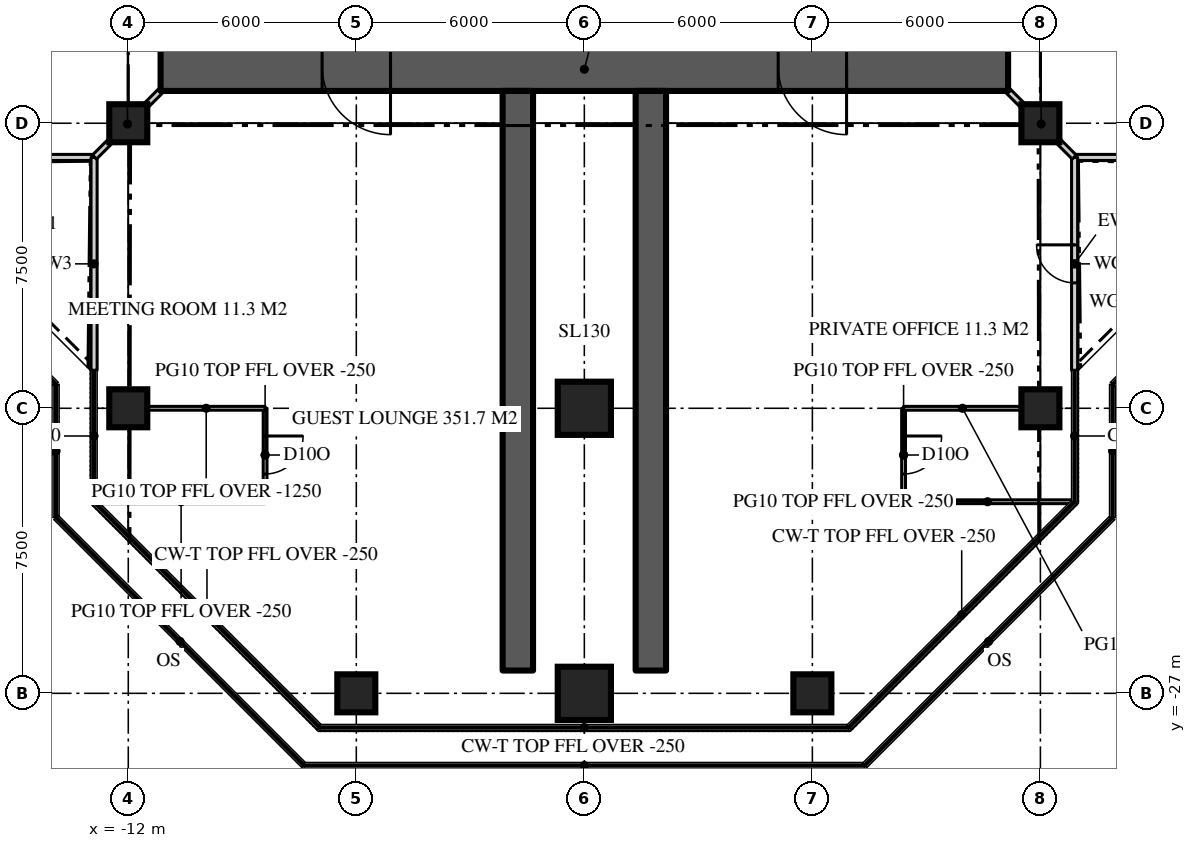
"""IFC4 building model, lengths in metres.
Left out: names, types, materials, properties, quantities, classifications, styles, units other than length and angle.
Written with IfcOpenShell. Run it as: python <this file> out.ifc"""

import sys

from ifc_helpers import new_model, si_unit, direction, frame, frame_2d, origin, origin_2d, place, context, subcontext, project, spatial, rectangle, extrude, element, fill, save


model = new_model("IFC4")
c1 = context("Model", 3, precision=1e-05, world=origin(), true_north=direction((0.0, 1.0)))
c2 = subcontext(c1, "Body", "Model", "MODEL_VIEW")
j1 = project(units=[si_unit("LENGTHUNIT", "METRE"), si_unit("PLANEANGLEUNIT", "RADIAN")], contexts=[c1])
p1 = place(None, origin())
s1 = spatial("IfcSite", under=j1, at=p1, CompositionType="ELEMENT")
p2 = place(p1, origin())
s2 = spatial("IfcBuilding", under=s1, at=p2, CompositionType="ELEMENT")
p3 = place(p2, frame((0.0, 0.0, 302.4)))
s3 = spatial("IfcBuildingStorey", under=s2, at=p3, CompositionType="ELEMENT", Elevation=302.4)
p4 = place(p3, frame((11.15, -10.5, 0.0), z_axis=(0.0, 0.0, 1.0), x_axis=(-1.0, 0.0, 0.0)))
e1 = element("IfcWall", 1, at=p4, inside=s3, PredefinedType="SHEAR", context=c2, shape_type="SweptSolid", body=[
    extrude(rectangle(XDim=22.3, YDim=1.3, at=frame_2d((11.15, 0.0))), origin(), (0.0, 0.0, 1.0), 3.9),
])
p5 = place(p4, frame((16.25, 0.0, 0.0)))
e2 = element("IfcOpeningElement", 2, at=p5, cuts=e1, PredefinedType="OPENING", context=c2, shape_type="SweptSolid", body=[
    extrude(rectangle(XDim=1.8, YDim=2.2, at=frame_2d((0.9, 1.1))), frame((0.0, 0.66, 0.0), z_axis=(0.0, -1.0, 0.0), x_axis=(1.0, 0.0, 0.0)), (0.0, 0.0, 1.0), 1.32),
])
p6 = place(p4, frame((4.25, 0.0, 0.0)))
e3 = element("IfcOpeningElement", 3, at=p6, cuts=e1, PredefinedType="OPENING", context=c2, shape_type="SweptSolid", body=[
    extrude(rectangle(XDim=1.8, YDim=2.2, at=frame_2d((0.9, 1.1))), frame((0.0, 0.66, 0.0), z_axis=(0.0, -1.0, 0.0), x_axis=(1.0, 0.0, 0.0)), (0.0, 0.0, 1.0), 1.32),
])
for number, where, z_axis, x_axis in (
    (4, (-1.75, -11.15, 0.0), (0.0, 0.0, 1.0), (0.0, -1.0, 0.0)),
    (5, (1.75, -11.15, 0.0), (0.0, 0.0, 1.0), (0.0, -1.0, 0.0)),
):
    element("IfcWall", number, at=place(p3, frame(where, z_axis=z_axis, x_axis=x_axis)), inside=s3, PredefinedType="SHEAR", context=c2, shape_type="SweptSolid", body=[
        extrude(rectangle(XDim=15.25, YDim=0.8, at=frame_2d((7.625, 0.0))), origin(), (0.0, 0.0, 1.0), 3.9),
    ])
p7 = place(p3, frame((-6.0, -27.0, 0.0), z_axis=(0.0, 0.0, 1.0), x_axis=(1.0, 0.0, 0.0)))
e6 = element("IfcColumn", 6, at=p7, inside=s3, PredefinedType="COLUMN", context=c2, shape_type="SweptSolid", body=[
    extrude(rectangle(XDim=1.0, YDim=1.0, at=origin_2d()), origin(), (0.0, 0.0, 1.0), 3.9),
])
p8 = place(p3, frame((0.0, -27.0, 0.0), z_axis=(0.0, 0.0, 1.0), x_axis=(1.0, 0.0, 0.0)))
e7 = element("IfcColumn", 7, at=p8, inside=s3, PredefinedType="COLUMN", context=c2, shape_type="SweptSolid", body=[
    extrude(rectangle(XDim=1.4, YDim=1.4, at=origin_2d()), origin(), (0.0, 0.0, 1.0), 3.9),
])
for number, where, z_axis, x_axis in (
    (8, (6.0, -27.0, 0.0), (0.0, 0.0, 1.0), (1.0, 0.0, 0.0)),
    (9, (-12.0, -19.5, 0.0), (0.0, 0.0, 1.0), (1.0, 0.0, 0.0)),
):
    element("IfcColumn", number, at=place(p3, frame(where, z_axis=z_axis, x_axis=x_axis)), inside=s3, PredefinedType="COLUMN", context=c2, shape_type="SweptSolid", body=[
        extrude(rectangle(XDim=1.0, YDim=1.0, at=origin_2d()), origin(), (0.0, 0.0, 1.0), 3.9),
    ])
p9 = place(p3, frame((0.0, -19.5, 0.0), z_axis=(0.0, 0.0, 1.0), x_axis=(1.0, 0.0, 0.0)))
e10 = element("IfcColumn", 10, at=p9, inside=s3, PredefinedType="COLUMN", context=c2, shape_type="SweptSolid", body=[
    extrude(rectangle(XDim=1.4, YDim=1.4, at=origin_2d()), origin(), (0.0, 0.0, 1.0), 3.9),
])
for number, where, z_axis, x_axis in (
    (11, (12.0, -19.5, 0.0), (0.0, 0.0, 1.0), (1.0, 0.0, 0.0)),
    (12, (-12.0, -12.0, 0.0), (0.0, 0.0, 1.0), (1.0, 0.0, 0.0)),
    (13, (12.0, -12.0, 0.0), (0.0, 0.0, 1.0), (1.0, 0.0, 0.0)),
):
    element("IfcColumn", number, at=place(p3, frame(where, z_axis=z_axis, x_axis=x_axis)), inside=s3, PredefinedType="COLUMN", context=c2, shape_type="SweptSolid", body=[
        extrude(rectangle(XDim=1.0, YDim=1.0, at=origin_2d()), origin(), (0.0, 0.0, 1.0), 3.9),
    ])
p10 = place(p3, frame((12.9, -12.9, 0.0), z_axis=(0.0, 0.0, 1.0), x_axis=(1.0, 0.0, 0.0)))
e14 = element("IfcWall", 14, at=p10, inside=s3, PredefinedType="SOLIDWALL", context=c2, shape_type="SweptSolid", body=[
    extrude(rectangle(XDim=5.6, YDim=0.16, at=frame_2d((2.8, 0.0))), origin(), (0.0, 0.0, 1.0), 3.65),
])
p11 = place(p3, frame((-18.5, -12.9, 0.0), z_axis=(0.0, 0.0, 1.0), x_axis=(1.0, 0.0, 0.0)))
e15 = element("IfcWall", 15, at=p11, inside=s3, PredefinedType="SOLIDWALL", context=c2, shape_type="SweptSolid", body=[
    extrude(rectangle(XDim=5.6, YDim=0.16, at=frame_2d((2.8, 0.0))), origin(), (0.0, 0.0, 1.0), 3.65),
])
p12 = place(p11, frame((2.3, 0.0, 0.0)))
e16 = element("IfcOpeningElement", 16, at=p12, cuts=e15, PredefinedType="OPENING", context=c2, shape_type="SweptSolid", body=[
    extrude(rectangle(XDim=1.0, YDim=2.2, at=frame_2d((0.5, 1.1))), frame((0.0, 0.09, 0.0), z_axis=(0.0, -1.0, 0.0), x_axis=(1.0, 0.0, 0.0)), (0.0, 0.0, 1.0), 0.18),
])
p13 = place(p3, frame((-12.9, -12.9, 0.0), z_axis=(0.0, 0.0, 1.0), x_axis=(0.0, -1.0, 0.0)))
e17 = element("IfcWall", 17, at=p13, inside=s3, PredefinedType="SOLIDWALL", context=c2, shape_type="SweptSolid", body=[
    extrude(rectangle(XDim=5.6, YDim=0.16, at=frame_2d((2.8, 0.0))), origin(), (0.0, 0.0, 1.0), 3.65),
])
p14 = place(p3, frame((12.9, -18.5, 0.0), z_axis=(0.0, 0.0, 1.0), x_axis=(0.0, 1.0, 0.0)))
e18 = element("IfcWall", 18, at=p14, inside=s3, PredefinedType="SOLIDWALL", context=c2, shape_type="SweptSolid", body=[
    extrude(rectangle(XDim=5.6, YDim=0.16, at=frame_2d((2.8, 0.0))), origin(), (0.0, 0.0, 1.0), 3.65),
])
p15 = place(p14, frame((2.3, 0.0, 0.0)))
e19 = element("IfcOpeningElement", 19, at=p15, cuts=e18, PredefinedType="OPENING", context=c2, shape_type="SweptSolid", body=[
    extrude(rectangle(XDim=1.0, YDim=2.2, at=frame_2d((0.5, 1.1))), frame((0.0, 0.09, 0.0), z_axis=(0.0, -1.0, 0.0), x_axis=(1.0, 0.0, 0.0)), (0.0, 0.0, 1.0), 0.18),
])
p16 = place(p3, frame((8.4, -19.5, 0.0), z_axis=(0.0, 0.0, 1.0), x_axis=(0.0, -1.0, 0.0)))
e20 = element("IfcWall", 20, at=p16, inside=s3, PredefinedType="PARTITIONING", context=c2, shape_type="SweptSolid", body=[
    extrude(rectangle(XDim=2.459, YDim=0.1, at=frame_2d((1.229, 0.0))), origin(), (0.0, 0.0, 1.0), 3.65),
])
p17 = place(p16, frame((0.729, 0.0, 0.0)))
e21 = element("IfcOpeningElement", 21, at=p17, cuts=e20, PredefinedType="OPENING", context=c2, shape_type="SweptSolid", body=[
    extrude(rectangle(XDim=1.0, YDim=2.2, at=frame_2d((0.5, 1.1))), frame((0.0, 0.06, 0.0), z_axis=(0.0, -1.0, 0.0), x_axis=(1.0, 0.0, 0.0)), (0.0, 0.0, 1.0), 0.12),
])
p18 = place(p3, frame((8.4, -19.5, 0.0), z_axis=(0.0, 0.0, 1.0), x_axis=(1.0, 0.0, 0.0)))
e22 = element("IfcWall", 22, at=p18, inside=s3, PredefinedType="PARTITIONING", context=c2, shape_type="SweptSolid", body=[
    extrude(rectangle(XDim=3.1, YDim=0.1, at=frame_2d((1.55, 0.0))), origin(), (0.0, 0.0, 1.0), 2.65),
])
p19 = place(p3, frame((8.4, -21.959, 0.0), z_axis=(0.0, 0.0, 1.0), x_axis=(1.0, 0.0, 0.0)))
e23 = element("IfcWall", 23, at=p19, inside=s3, PredefinedType="PARTITIONING", context=c2, shape_type="SweptSolid", body=[
    extrude(rectangle(XDim=4.42, YDim=0.1, at=frame_2d((2.21, 0.0))), origin(), (0.0, 0.0, 1.0), 3.65),
])
p20 = place(p3, frame((-8.4, -19.5, 0.0), z_axis=(0.0, 0.0, 1.0), x_axis=(0.0, -1.0, 0.0)))
e24 = element("IfcWall", 24, at=p20, inside=s3, PredefinedType="PARTITIONING", context=c2, shape_type="SweptSolid", body=[
    extrude(rectangle(XDim=2.459, YDim=0.1, at=frame_2d((1.229, 0.0))), origin(), (0.0, 0.0, 1.0), 3.65),
])
p21 = place(p20, frame((0.729, 0.0, 0.0)))
e25 = element("IfcOpeningElement", 25, at=p21, cuts=e24, PredefinedType="OPENING", context=c2, shape_type="SweptSolid", body=[
    extrude(rectangle(XDim=1.0, YDim=2.2, at=frame_2d((0.5, 1.1))), frame((0.0, 0.06, 0.0), z_axis=(0.0, -1.0, 0.0), x_axis=(1.0, 0.0, 0.0)), (0.0, 0.0, 1.0), 0.12),
])
p22 = place(p3, frame((-8.4, -19.5, 0.0), z_axis=(0.0, 0.0, 1.0), x_axis=(-1.0, 0.0, 0.0)))
e26 = element("IfcWall", 26, at=p22, inside=s3, PredefinedType="PARTITIONING", context=c2, shape_type="SweptSolid", body=[
    extrude(rectangle(XDim=3.1, YDim=0.1, at=frame_2d((1.55, 0.0))), origin(), (0.0, 0.0, 1.0), 2.65),
])
p23 = place(p3, frame((-8.4, -21.959, 0.0), z_axis=(0.0, 0.0, 1.0), x_axis=(-1.0, 0.0, 0.0)))
e27 = element("IfcWall", 27, at=p23, inside=s3, PredefinedType="PARTITIONING", context=c2, shape_type="SweptSolid", body=[
    extrude(rectangle(XDim=4.42, YDim=0.1, at=frame_2d((2.21, 0.0))), origin(), (0.0, 0.0, 1.0), 3.65),
])
for number, where, z_axis, x_axis in (
    (28, (-11.15, -11.15, 0.0), (0.0, 0.0, 1.0), (-0.707, -0.707, 0.0)),
    (29, (11.15, -11.15, 0.0), (0.0, 0.0, 1.0), (0.707, -0.707, 0.0)),
):
    element("IfcWall", number, at=place(p3, frame(where, z_axis=z_axis, x_axis=x_axis)), inside=s3, PredefinedType="PARTITIONING", context=c2, shape_type="SweptSolid", body=[
        extrude(rectangle(XDim=2.461, YDim=0.15, at=frame_2d((1.23, 0.0))), origin(), (0.0, 0.0, 1.0), 3.72),
    ])
p24 = place(p15, origin())
e30 = element("IfcDoor", 30, at=p24, inside=s3, OperationType="SINGLE_SWING_RIGHT", PredefinedType="DOOR", context=c2, shape_type="SweptSolid", body=[
    extrude(rectangle(XDim=1.0, YDim=2.2, at=frame_2d((0.5, 1.1))), frame((0.0, 0.025, 0.0), z_axis=(0.0, -1.0, 0.0), x_axis=(1.0, 0.0, 0.0)), (0.0, 0.0, 1.0), 0.05),
])
fill(e19, e30)
p25 = place(p5, origin())
e31 = element("IfcDoor", 31, at=p25, inside=s3, OperationType="DOUBLE_DOOR_DOUBLE_SWING", PredefinedType="DOOR", context=c2, shape_type="SweptSolid", body=[
    extrude(rectangle(XDim=1.8, YDim=2.2, at=frame_2d((0.9, 1.1))), frame((0.0, 0.025, 0.0), z_axis=(0.0, -1.0, 0.0), x_axis=(1.0, 0.0, 0.0)), (0.0, 0.0, 1.0), 0.05),
])
fill(e2, e31)
p26 = place(p6, origin())
e32 = element("IfcDoor", 32, at=p26, inside=s3, OperationType="DOUBLE_DOOR_DOUBLE_SWING", PredefinedType="DOOR", context=c2, shape_type="SweptSolid", body=[
    extrude(rectangle(XDim=1.8, YDim=2.2, at=frame_2d((0.9, 1.1))), frame((0.0, 0.025, 0.0), z_axis=(0.0, -1.0, 0.0), x_axis=(1.0, 0.0, 0.0)), (0.0, 0.0, 1.0), 0.05),
])
fill(e3, e32)
p27 = place(p17, origin())
e33 = element("IfcDoor", 33, at=p27, inside=s3, OperationType="SINGLE_SWING_LEFT", PredefinedType="DOOR", context=c2, shape_type="SweptSolid", body=[
    extrude(rectangle(XDim=1.0, YDim=2.2, at=frame_2d((0.5, 1.1))), frame((0.0, 0.025, 0.0), z_axis=(0.0, -1.0, 0.0), x_axis=(1.0, 0.0, 0.0)), (0.0, 0.0, 1.0), 0.05),
])
fill(e21, e33)
p28 = place(p21, origin())
e34 = element("IfcDoor", 34, at=p28, inside=s3, OperationType="SINGLE_SWING_LEFT", PredefinedType="DOOR", context=c2, shape_type="SweptSolid", body=[
    extrude(rectangle(XDim=1.0, YDim=2.2, at=frame_2d((0.5, 1.1))), frame((0.0, 0.025, 0.0), z_axis=(0.0, -1.0, 0.0), x_axis=(1.0, 0.0, 0.0)), (0.0, 0.0, 1.0), 0.05),
])
fill(e25, e34)
save(model, sys.argv[1])
